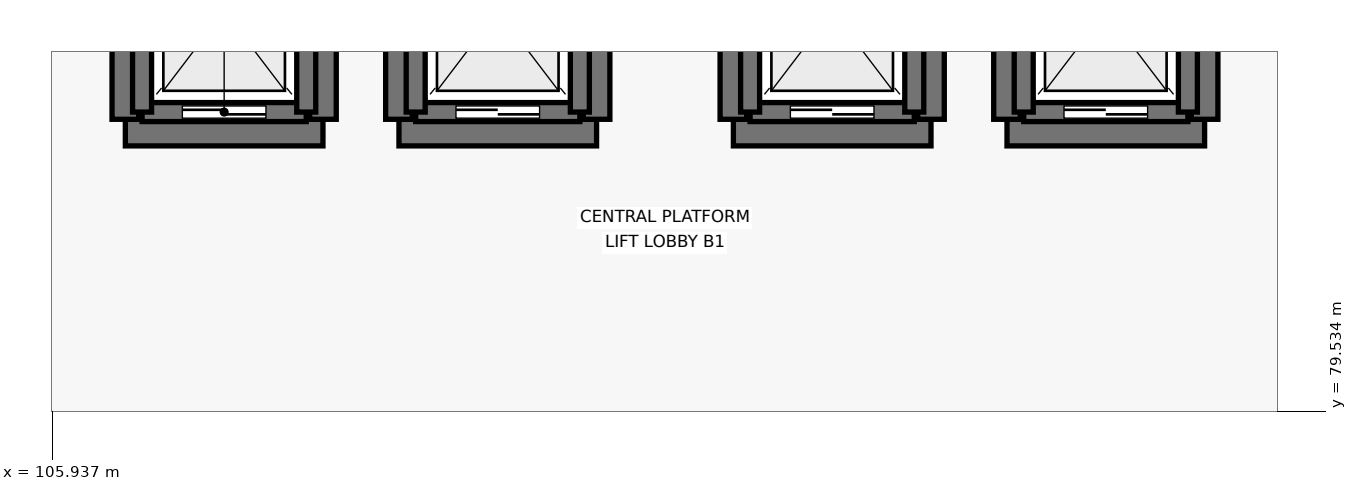
"""IFC4 building model, lengths in metres.
Left out: names, types, materials, properties, quantities, classifications, styles, units other than length and angle.
Written with IfcOpenShell. Run it as: python <this file> out.ifc"""

import sys

from ifc_helpers import new_model, si_unit, direction, frame, frame_2d, origin, place, context, subcontext, project, spatial, rectangle, extrude, element, fill, save


model = new_model("IFC4")
c1 = context("Model", 3, precision=1e-05, world=origin(), true_north=direction((0.0, 1.0)))
c2 = subcontext(c1, "Body", "Model", "MODEL_VIEW")
j1 = project(units=[si_unit("LENGTHUNIT", "METRE"), si_unit("PLANEANGLEUNIT", "RADIAN")], contexts=[c1])
p1 = place(None, origin())
s1 = spatial("IfcSite", under=j1, at=p1, CompositionType="ELEMENT")
p2 = place(p1, origin())
s2 = spatial("IfcBuilding", under=s1, at=p2, CompositionType="ELEMENT")
p3 = place(p2, frame((0.0, 0.0, -6.0)))
s3 = spatial("IfcBuildingStorey", under=s2, at=p3, CompositionType="ELEMENT", Elevation=-6.0)
p4 = place(p3, frame((106.9, 83.2, -1.2), z_axis=(0.0, 0.0, 1.0), x_axis=(1.0, 0.0, 0.0)))
e1 = element("IfcWall", 1, at=p4, inside=s3, PredefinedType="SOLIDWALL", context=c2, shape_type="SweptSolid", body=[
    extrude(rectangle(XDim=2.6, YDim=0.35, at=frame_2d((1.3, 0.0))), origin(), (0.0, 0.0, 1.0), 1.2),
])
for number, where, z_axis, x_axis in (
    (2, (109.5, 83.375, -1.2), (0.0, 0.0, 1.0), (0.0, 1.0, 0.0)),
    (3, (106.9, 86.225, -1.2), (0.0, 0.0, 1.0), (0.0, -1.0, 0.0)),
):
    element("IfcWall", number, at=place(p3, frame(where, z_axis=z_axis, x_axis=x_axis)), inside=s3, PredefinedType="SOLIDWALL", context=c2, shape_type="SweptSolid", body=[
        extrude(rectangle(XDim=2.85, YDim=0.35, at=frame_2d((1.425, 0.0))), origin(), (0.0, 0.0, 1.0), 1.2),
    ])
p5 = place(p3, frame((110.5, 83.2, -1.2), z_axis=(0.0, 0.0, 1.0), x_axis=(1.0, 0.0, 0.0)))
e4 = element("IfcWall", 4, at=p5, inside=s3, PredefinedType="SOLIDWALL", context=c2, shape_type="SweptSolid", body=[
    extrude(rectangle(XDim=2.6, YDim=0.35, at=frame_2d((1.3, 0.0))), origin(), (0.0, 0.0, 1.0), 1.2),
])
for number, where, z_axis, x_axis in (
    (5, (113.1, 83.375, -1.2), (0.0, 0.0, 1.0), (0.0, 1.0, 0.0)),
    (6, (110.5, 86.225, -1.2), (0.0, 0.0, 1.0), (0.0, -1.0, 0.0)),
):
    element("IfcWall", number, at=place(p3, frame(where, z_axis=z_axis, x_axis=x_axis)), inside=s3, PredefinedType="SOLIDWALL", context=c2, shape_type="SweptSolid", body=[
        extrude(rectangle(XDim=2.85, YDim=0.35, at=frame_2d((1.425, 0.0))), origin(), (0.0, 0.0, 1.0), 1.2),
    ])
p6 = place(p3, frame((114.9, 83.2, -1.2), z_axis=(0.0, 0.0, 1.0), x_axis=(1.0, 0.0, 0.0)))
e7 = element("IfcWall", 7, at=p6, inside=s3, PredefinedType="SOLIDWALL", context=c2, shape_type="SweptSolid", body=[
    extrude(rectangle(XDim=2.6, YDim=0.35, at=frame_2d((1.3, 0.0))), origin(), (0.0, 0.0, 1.0), 1.2),
])
for number, where, z_axis, x_axis in (
    (8, (117.5, 83.375, -1.2), (0.0, 0.0, 1.0), (0.0, 1.0, 0.0)),
    (9, (114.9, 86.225, -1.2), (0.0, 0.0, 1.0), (0.0, -1.0, 0.0)),
):
    element("IfcWall", number, at=place(p3, frame(where, z_axis=z_axis, x_axis=x_axis)), inside=s3, PredefinedType="SOLIDWALL", context=c2, shape_type="SweptSolid", body=[
        extrude(rectangle(XDim=2.85, YDim=0.35, at=frame_2d((1.425, 0.0))), origin(), (0.0, 0.0, 1.0), 1.2),
    ])
p7 = place(p3, frame((118.5, 83.2, -1.2), z_axis=(0.0, 0.0, 1.0), x_axis=(1.0, 0.0, 0.0)))
e10 = element("IfcWall", 10, at=p7, inside=s3, PredefinedType="SOLIDWALL", context=c2, shape_type="SweptSolid", body=[
    extrude(rectangle(XDim=2.6, YDim=0.35, at=frame_2d((1.3, 0.0))), origin(), (0.0, 0.0, 1.0), 1.2),
])
for number, where, z_axis, x_axis in (
    (11, (121.1, 83.375, -1.2), (0.0, 0.0, 1.0), (0.0, 1.0, 0.0)),
    (12, (118.5, 86.225, -1.2), (0.0, 0.0, 1.0), (0.0, -1.0, 0.0)),
):
    element("IfcWall", number, at=place(p3, frame(where, z_axis=z_axis, x_axis=x_axis)), inside=s3, PredefinedType="SOLIDWALL", context=c2, shape_type="SweptSolid", body=[
        extrude(rectangle(XDim=2.85, YDim=0.35, at=frame_2d((1.425, 0.0))), origin(), (0.0, 0.0, 1.0), 1.2),
    ])
p8 = place(p3, frame((107.12, 83.47, 0.0), z_axis=(0.0, 0.0, 1.0), x_axis=(1.0, 0.0, 0.0)))
e13 = element("IfcWall", 13, at=p8, inside=s3, PredefinedType="SHEAR", context=c2, shape_type="SweptSolid", body=[
    extrude(rectangle(XDim=2.16, YDim=0.25, at=frame_2d((1.08, 0.0))), origin(), (0.0, 0.0, 1.0), 5.75),
])
p9 = place(p8, frame((0.53, 0.0, 0.0)))
e14 = element("IfcOpeningElement", 14, at=p9, cuts=e13, PredefinedType="OPENING", context=c2, shape_type="SweptSolid", body=[
    extrude(rectangle(XDim=1.1, YDim=2.2, at=frame_2d((0.55, 1.1))), frame((0.0, 0.135, 0.0), z_axis=(0.0, -1.0, 0.0), x_axis=(1.0, 0.0, 0.0)), (0.0, 0.0, 1.0), 0.27),
])
for number, where, z_axis, x_axis in (
    (15, (109.28, 83.47, 0.0), (0.0, 0.0, 1.0), (0.0, 1.0, 0.0)),
    (16, (107.12, 86.13, 0.0), (0.0, 0.0, 1.0), (0.0, -1.0, 0.0)),
):
    element("IfcWall", number, at=place(p3, frame(where, z_axis=z_axis, x_axis=x_axis)), inside=s3, PredefinedType="SHEAR", context=c2, shape_type="SweptSolid", body=[
        extrude(rectangle(XDim=2.66, YDim=0.25, at=frame_2d((1.33, 0.0))), origin(), (0.0, 0.0, 1.0), 5.75),
    ])
p10 = place(p3, frame((110.72, 83.47, 0.0), z_axis=(0.0, 0.0, 1.0), x_axis=(1.0, 0.0, 0.0)))
e17 = element("IfcWall", 17, at=p10, inside=s3, PredefinedType="SHEAR", context=c2, shape_type="SweptSolid", body=[
    extrude(rectangle(XDim=2.16, YDim=0.25, at=frame_2d((1.08, 0.0))), origin(), (0.0, 0.0, 1.0), 5.75),
])
p11 = place(p10, frame((0.53, 0.0, 0.0)))
e18 = element("IfcOpeningElement", 18, at=p11, cuts=e17, PredefinedType="OPENING", context=c2, shape_type="SweptSolid", body=[
    extrude(rectangle(XDim=1.1, YDim=2.2, at=frame_2d((0.55, 1.1))), frame((0.0, 0.135, 0.0), z_axis=(0.0, -1.0, 0.0), x_axis=(1.0, 0.0, 0.0)), (0.0, 0.0, 1.0), 0.27),
])
for number, where, z_axis, x_axis in (
    (19, (112.88, 83.47, 0.0), (0.0, 0.0, 1.0), (0.0, 1.0, 0.0)),
    (20, (110.72, 86.13, 0.0), (0.0, 0.0, 1.0), (0.0, -1.0, 0.0)),
):
    element("IfcWall", number, at=place(p3, frame(where, z_axis=z_axis, x_axis=x_axis)), inside=s3, PredefinedType="SHEAR", context=c2, shape_type="SweptSolid", body=[
        extrude(rectangle(XDim=2.66, YDim=0.25, at=frame_2d((1.33, 0.0))), origin(), (0.0, 0.0, 1.0), 5.75),
    ])
p12 = place(p3, frame((115.12, 83.47, 0.0), z_axis=(0.0, 0.0, 1.0), x_axis=(1.0, 0.0, 0.0)))
e21 = element("IfcWall", 21, at=p12, inside=s3, PredefinedType="SHEAR", context=c2, shape_type="SweptSolid", body=[
    extrude(rectangle(XDim=2.16, YDim=0.25, at=frame_2d((1.08, 0.0))), origin(), (0.0, 0.0, 1.0), 5.75),
])
p13 = place(p12, frame((0.53, 0.0, 0.0)))
e22 = element("IfcOpeningElement", 22, at=p13, cuts=e21, PredefinedType="OPENING", context=c2, shape_type="SweptSolid", body=[
    extrude(rectangle(XDim=1.1, YDim=2.2, at=frame_2d((0.55, 1.1))), frame((0.0, 0.135, 0.0), z_axis=(0.0, -1.0, 0.0), x_axis=(1.0, 0.0, 0.0)), (0.0, 0.0, 1.0), 0.27),
])
for number, where, z_axis, x_axis in (
    (23, (117.28, 83.47, 0.0), (0.0, 0.0, 1.0), (0.0, 1.0, 0.0)),
    (24, (115.12, 86.13, 0.0), (0.0, 0.0, 1.0), (0.0, -1.0, 0.0)),
):
    element("IfcWall", number, at=place(p3, frame(where, z_axis=z_axis, x_axis=x_axis)), inside=s3, PredefinedType="SHEAR", context=c2, shape_type="SweptSolid", body=[
        extrude(rectangle(XDim=2.66, YDim=0.25, at=frame_2d((1.33, 0.0))), origin(), (0.0, 0.0, 1.0), 5.75),
    ])
p14 = place(p3, frame((118.72, 83.47, 0.0), z_axis=(0.0, 0.0, 1.0), x_axis=(1.0, 0.0, 0.0)))
e25 = element("IfcWall", 25, at=p14, inside=s3, PredefinedType="SHEAR", context=c2, shape_type="SweptSolid", body=[
    extrude(rectangle(XDim=2.16, YDim=0.25, at=frame_2d((1.08, 0.0))), origin(), (0.0, 0.0, 1.0), 5.75),
])
p15 = place(p14, frame((0.53, 0.0, 0.0)))
e26 = element("IfcOpeningElement", 26, at=p15, cuts=e25, PredefinedType="OPENING", context=c2, shape_type="SweptSolid", body=[
    extrude(rectangle(XDim=1.1, YDim=2.2, at=frame_2d((0.55, 1.1))), frame((0.0, 0.135, 0.0), z_axis=(0.0, -1.0, 0.0), x_axis=(1.0, 0.0, 0.0)), (0.0, 0.0, 1.0), 0.27),
])
for number, where, z_axis, x_axis in (
    (27, (120.88, 83.47, 0.0), (0.0, 0.0, 1.0), (0.0, 1.0, 0.0)),
    (28, (118.72, 86.13, 0.0), (0.0, 0.0, 1.0), (0.0, -1.0, 0.0)),
):
    element("IfcWall", number, at=place(p3, frame(where, z_axis=z_axis, x_axis=x_axis)), inside=s3, PredefinedType="SHEAR", context=c2, shape_type="SweptSolid", body=[
        extrude(rectangle(XDim=2.66, YDim=0.25, at=frame_2d((1.33, 0.0))), origin(), (0.0, 0.0, 1.0), 5.75),
    ])
p16 = place(p9, origin())
e29 = element("IfcDoor", 29, at=p16, inside=s3, OperationType="SLIDING_TO_LEFT", PredefinedType="DOOR", context=c2, shape_type="SweptSolid", body=[
    extrude(rectangle(XDim=1.1, YDim=2.2, at=frame_2d((0.55, 1.1))), frame((0.0, 0.025, 0.0), z_axis=(0.0, -1.0, 0.0), x_axis=(1.0, 0.0, 0.0)), (0.0, 0.0, 1.0), 0.05),
])
fill(e14, e29)
p17 = place(p11, origin())
e30 = element("IfcDoor", 30, at=p17, inside=s3, OperationType="SLIDING_TO_LEFT", PredefinedType="DOOR", context=c2, shape_type="SweptSolid", body=[
    extrude(rectangle(XDim=1.1, YDim=2.2, at=frame_2d((0.55, 1.1))), frame((0.0, 0.025, 0.0), z_axis=(0.0, -1.0, 0.0), x_axis=(1.0, 0.0, 0.0)), (0.0, 0.0, 1.0), 0.05),
])
fill(e18, e30)
p18 = place(p13, origin())
e31 = element("IfcDoor", 31, at=p18, inside=s3, OperationType="SLIDING_TO_LEFT", PredefinedType="DOOR", context=c2, shape_type="SweptSolid", body=[
    extrude(rectangle(XDim=1.1, YDim=2.2, at=frame_2d((0.55, 1.1))), frame((0.0, 0.025, 0.0), z_axis=(0.0, -1.0, 0.0), x_axis=(1.0, 0.0, 0.0)), (0.0, 0.0, 1.0), 0.05),
])
fill(e22, e31)
p19 = place(p15, origin())
e32 = element("IfcDoor", 32, at=p19, inside=s3, OperationType="SLIDING_TO_LEFT", PredefinedType="DOOR", context=c2, shape_type="SweptSolid", body=[
    extrude(rectangle(XDim=1.1, YDim=2.2, at=frame_2d((0.55, 1.1))), frame((0.0, 0.025, 0.0), z_axis=(0.0, -1.0, 0.0), x_axis=(1.0, 0.0, 0.0)), (0.0, 0.0, 1.0), 0.05),
])
fill(e26, e32)
save(model, sys.argv[1])
